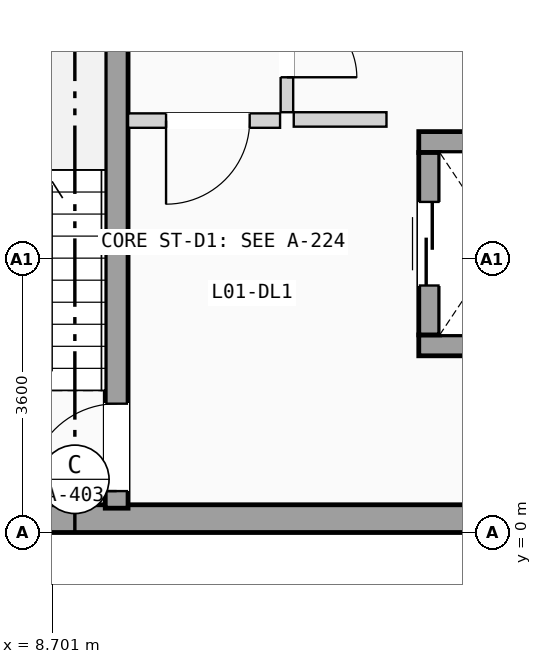
"""IFC4 building model, lengths in metres.
Left out: names, types, materials, properties, quantities, classifications, styles, units other than length and angle.
Written with IfcOpenShell. Run it as: python <this file> out.ifc"""

import sys

from ifc_helpers import new_model, si_unit, direction, frame, frame_2d, origin, place, context, subcontext, project, spatial, rectangle, extrude, element, fill, save


model = new_model("IFC4")
c1 = context("Model", 3, precision=1e-05, world=origin(), true_north=direction((0.0, 1.0)))
c2 = subcontext(c1, "Body", "Model", "MODEL_VIEW")
j1 = project(units=[si_unit("LENGTHUNIT", "METRE"), si_unit("PLANEANGLEUNIT", "RADIAN")], contexts=[c1])
p1 = place(None, origin())
s1 = spatial("IfcSite", under=j1, at=p1, CompositionType="ELEMENT")
p2 = place(p1, origin())
s2 = spatial("IfcBuilding", under=s1, at=p2, CompositionType="ELEMENT")
p3 = place(p2, frame((0.0, 0.0, 4.9)))
s3 = spatial("IfcBuildingStorey", under=s2, at=p3, CompositionType="ELEMENT", Elevation=4.9)
p4 = place(p3, frame((0.0, 0.183, 0.0), z_axis=(0.0, 0.0, 1.0), x_axis=(1.0, 0.0, 0.0)))
e1 = element("IfcWall", 1, at=p4, inside=s3, PredefinedType="SOLIDWALL", context=c2, shape_type="SweptSolid", body=[
    extrude(rectangle(XDim=21.6, YDim=0.365, at=frame_2d((10.8, 0.0))), origin(), (0.0, 0.0, 1.0), 3.415),
])
p5 = place(p3, frame((9.55, 0.32, 0.0), z_axis=(0.0, 0.0, 1.0), x_axis=(0.0, 1.0, 0.0)))
e2 = element("IfcWall", 2, at=p5, inside=s3, PredefinedType="SHEAR", context=c2, shape_type="SweptSolid", body=[
    extrude(rectangle(XDim=7.0, YDim=0.3, at=frame_2d((3.5, 0.0))), origin(), (0.0, 0.0, 1.0), 3.415),
])
p6 = place(p5, frame((0.225, 0.0, 0.0)))
e3 = element("IfcOpeningElement", 3, at=p6, cuts=e2, PredefinedType="OPENING", context=c2, shape_type="SweptSolid", body=[
    extrude(rectangle(XDim=1.15, YDim=2.12, at=frame_2d((0.575, 1.06))), frame((0.0, 0.16, 0.0), z_axis=(0.0, -1.0, 0.0), x_axis=(1.0, 0.0, 0.0)), (0.0, 0.0, 1.0), 0.32),
])
for number, where, z_axis, x_axis in (
    (4, (13.525, 2.462, 0.0), (0.0, 0.0, 1.0), (1.0, 0.0, 0.0)),
    (5, (13.525, 5.137, 0.0), (0.0, 0.0, 1.0), (1.0, 0.0, 0.0)),
):
    element("IfcWall", number, at=place(p3, frame(where, z_axis=z_axis, x_axis=x_axis)), inside=s3, PredefinedType="SHEAR", context=c2, shape_type="SweptSolid", body=[
        extrude(rectangle(XDim=2.15, YDim=0.275, at=frame_2d((1.075, 0.0))), origin(), (0.0, 0.0, 1.0), 3.415),
    ])
p7 = place(p3, frame((13.663, 2.6, 0.0), z_axis=(0.0, 0.0, 1.0), x_axis=(0.0, 1.0, 0.0)))
e6 = element("IfcWall", 6, at=p7, inside=s3, PredefinedType="SHEAR", context=c2, shape_type="SweptSolid", body=[
    extrude(rectangle(XDim=2.4, YDim=0.275, at=frame_2d((1.2, 0.0))), origin(), (0.0, 0.0, 1.0), 3.415),
])
p8 = place(p7, frame((0.65, 0.0, 0.0)))
e7 = element("IfcOpeningElement", 7, at=p8, cuts=e6, PredefinedType="OPENING", context=c2, shape_type="SweptSolid", body=[
    extrude(rectangle(XDim=1.1, YDim=2.15, at=frame_2d((0.55, 1.075))), frame((0.0, 0.147, 0.0), z_axis=(0.0, -1.0, 0.0), x_axis=(1.0, 0.0, 0.0)), (0.0, 0.0, 1.0), 0.295),
])
p9 = place(p3, frame((11.88, 5.435, 0.0), z_axis=(0.0, 0.0, 1.0), x_axis=(1.0, 0.0, 0.0)))
e8 = element("IfcWall", 8, at=p9, inside=s3, PredefinedType="PARTITIONING", context=c2, shape_type="SweptSolid", body=[
    extrude(rectangle(XDim=1.22, YDim=0.19, at=frame_2d((0.61, 0.0))), origin(), (0.0, 0.0, 1.0), 3.395),
])
p10 = place(p3, frame((9.7, 5.42, 0.0), z_axis=(0.0, 0.0, 1.0), x_axis=(1.0, 0.0, 0.0)))
e9 = element("IfcWall", 9, at=p10, inside=s3, PredefinedType="PARTITIONING", context=c2, shape_type="SweptSolid", body=[
    extrude(rectangle(XDim=2.0, YDim=0.19, at=frame_2d((1.0, 0.0))), origin(), (0.0, 0.0, 1.0), 3.395),
])
p11 = place(p10, frame((0.5, 0.0, 0.0)))
e10 = element("IfcOpeningElement", 10, at=p11, cuts=e9, PredefinedType="OPENING", context=c2, shape_type="SweptSolid", body=[
    extrude(rectangle(XDim=1.1, YDim=2.12, at=frame_2d((0.55, 1.06))), frame((0.0, 0.105, 0.0), z_axis=(0.0, -1.0, 0.0), x_axis=(1.0, 0.0, 0.0)), (0.0, 0.0, 1.0), 0.21),
])
p12 = place(p3, frame((11.79, 5.53, 0.0), z_axis=(0.0, 0.0, 1.0), x_axis=(0.0, 1.0, 0.0)))
e11 = element("IfcWall", 11, at=p12, inside=s3, PredefinedType="PARTITIONING", context=c2, shape_type="SweptSolid", body=[
    extrude(rectangle(XDim=1.82, YDim=0.165, at=frame_2d((0.91, 0.0))), origin(), (0.0, 0.0, 1.0), 3.395),
])
p13 = place(p12, frame((0.46, 0.0, 0.0)))
e12 = element("IfcOpeningElement", 12, at=p13, cuts=e11, PredefinedType="OPENING", context=c2, shape_type="SweptSolid", body=[
    extrude(rectangle(XDim=0.92, YDim=2.04, at=frame_2d((0.46, 1.02))), frame((0.0, 0.093, 0.0), z_axis=(0.0, -1.0, 0.0), x_axis=(1.0, 0.0, 0.0)), (0.0, 0.0, 1.0), 0.185),
])
p14 = place(p6, origin())
e13 = element("IfcDoor", 13, at=p14, inside=s3, OperationType="SINGLE_SWING_LEFT", PredefinedType="DOOR", context=c2, shape_type="SweptSolid", body=[
    extrude(rectangle(XDim=1.15, YDim=2.12, at=frame_2d((0.575, 1.06))), frame((0.0, 0.025, 0.0), z_axis=(0.0, -1.0, 0.0), x_axis=(1.0, 0.0, 0.0)), (0.0, 0.0, 1.0), 0.05),
])
fill(e3, e13)
p15 = place(p8, origin())
e14 = element("IfcDoor", 14, at=p15, inside=s3, OperationType="SLIDING_TO_LEFT", PredefinedType="DOOR", context=c2, shape_type="SweptSolid", body=[
    extrude(rectangle(XDim=1.1, YDim=2.15, at=frame_2d((0.55, 1.075))), frame((0.0, 0.025, 0.0), z_axis=(0.0, -1.0, 0.0), x_axis=(1.0, 0.0, 0.0)), (0.0, 0.0, 1.0), 0.05),
])
fill(e7, e14)
p16 = place(p11, frame((1.1, 0.0, 0.0), z_axis=(0.0, 0.0, 1.0), x_axis=(-1.0, 0.0, 0.0)))
e15 = element("IfcDoor", 15, at=p16, inside=s3, OperationType="SINGLE_SWING_LEFT", PredefinedType="DOOR", context=c2, shape_type="SweptSolid", body=[
    extrude(rectangle(XDim=1.1, YDim=2.12, at=frame_2d((0.55, 1.06))), frame((0.0, 0.025, 0.0), z_axis=(0.0, -1.0, 0.0), x_axis=(1.0, 0.0, 0.0)), (0.0, 0.0, 1.0), 0.05),
])
fill(e10, e15)
p17 = place(p13, frame((0.92, 0.0, 0.0), z_axis=(0.0, 0.0, 1.0), x_axis=(-1.0, 0.0, 0.0)))
e16 = element("IfcDoor", 16, at=p17, inside=s3, OperationType="SINGLE_SWING_LEFT", PredefinedType="DOOR", context=c2, shape_type="SweptSolid", body=[
    extrude(rectangle(XDim=0.92, YDim=2.04, at=frame_2d((0.46, 1.02))), frame((0.0, 0.025, 0.0), z_axis=(0.0, -1.0, 0.0), x_axis=(1.0, 0.0, 0.0)), (0.0, 0.0, 1.0), 0.05),
])
fill(e12, e16)
save(model, sys.argv[1])
